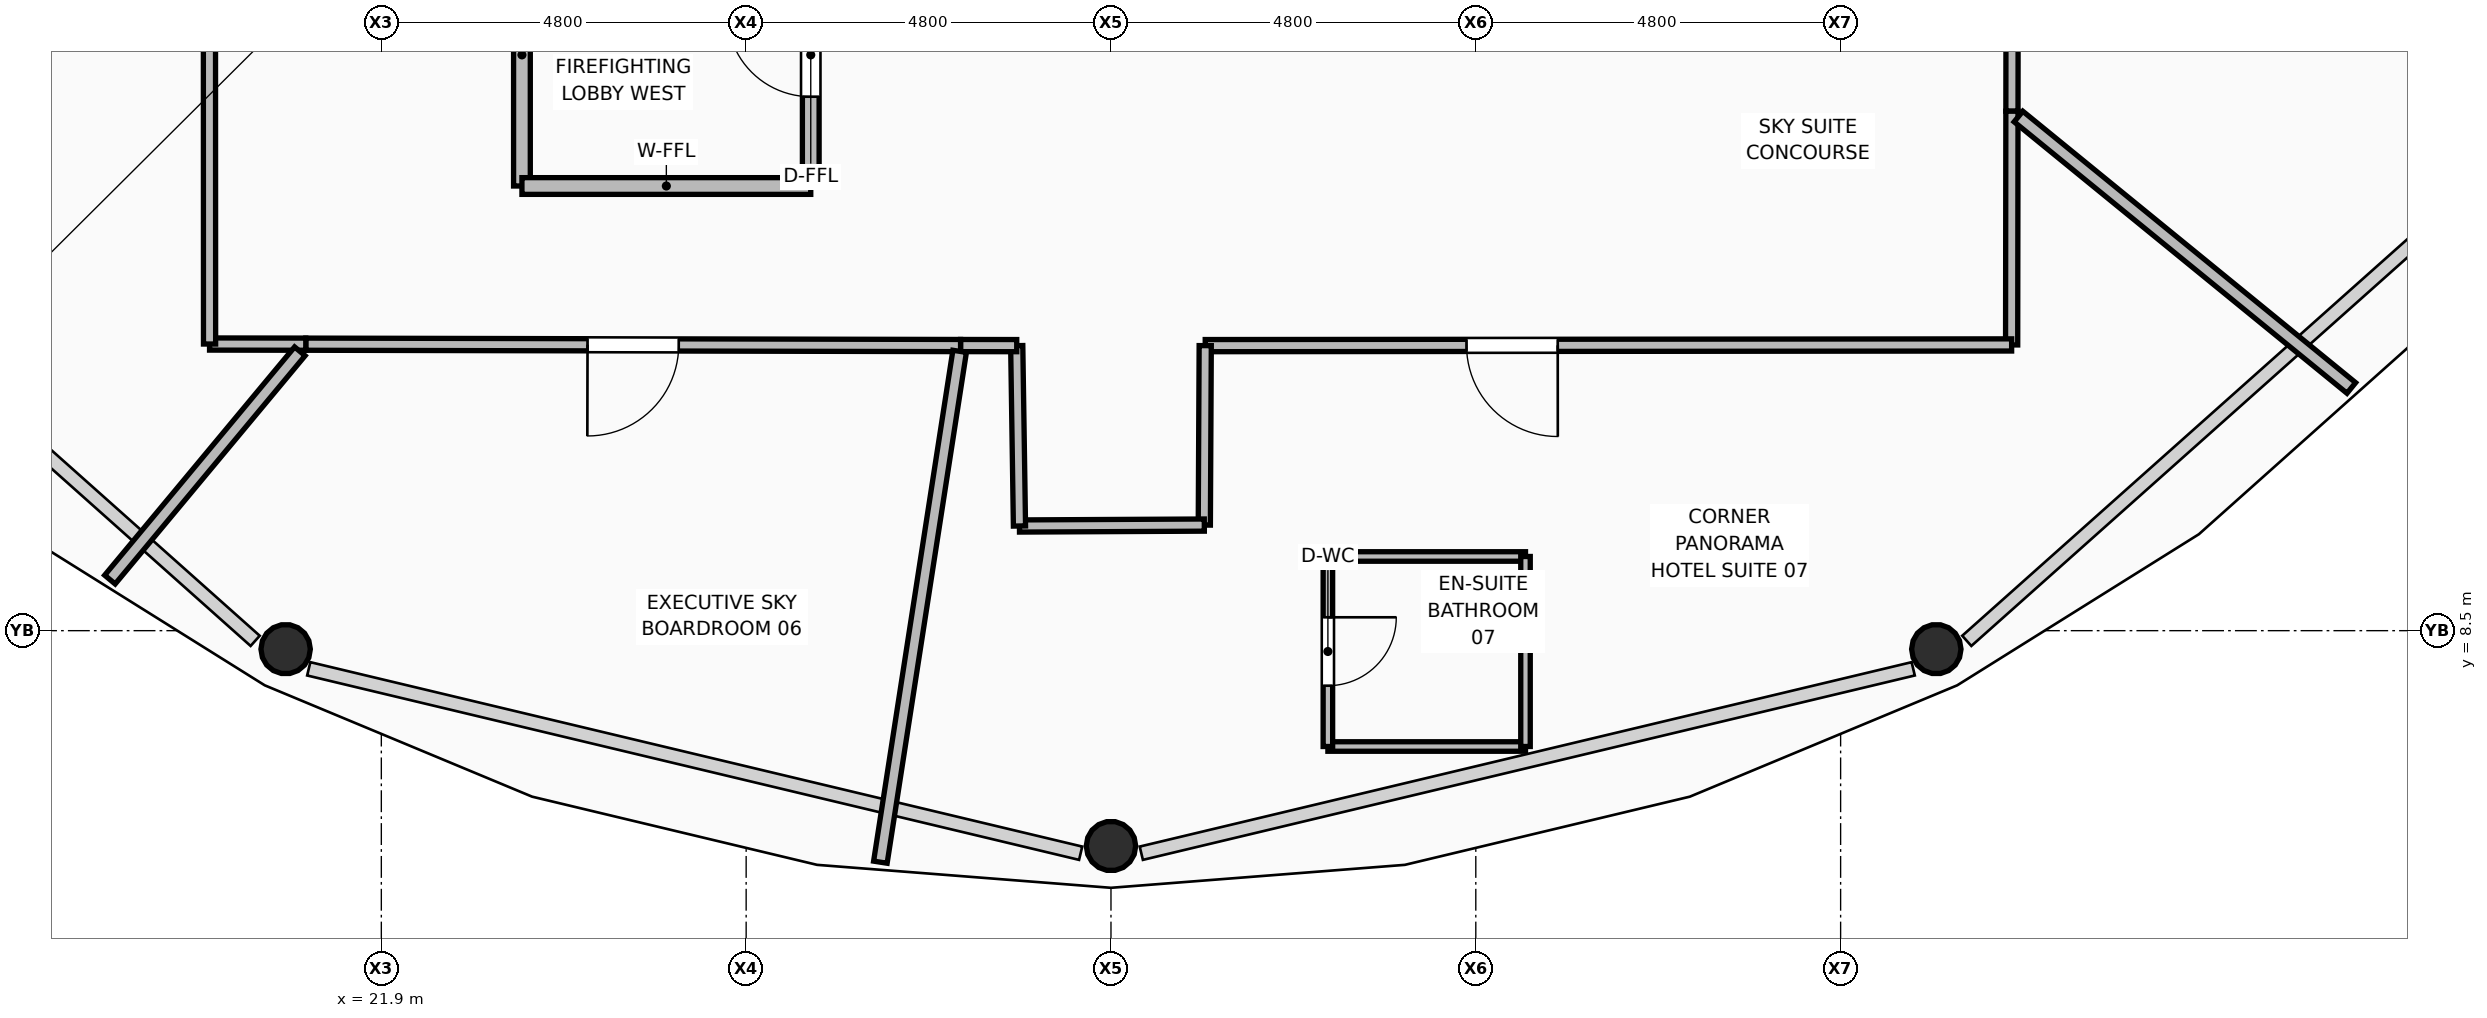
"""IFC4 building model, lengths in metres.
Left out: names, types, materials, properties, quantities, classifications, styles, units other than length and angle.
Written with IfcOpenShell. Run it as: python <this file> out.ifc"""

import sys

from ifc_helpers import new_model, si_unit, direction, frame, frame_2d, origin, origin_2d, place, context, subcontext, project, spatial, rectangle, hollow_circle, extrude, element, fill, save


model = new_model("IFC4")
c1 = context("Model", 3, precision=1e-05, world=origin(), true_north=direction((0.0, 1.0)))
c2 = subcontext(c1, "Body", "Model", "MODEL_VIEW")
j1 = project(units=[si_unit("LENGTHUNIT", "METRE"), si_unit("PLANEANGLEUNIT", "RADIAN")], contexts=[c1])
p1 = place(None, origin())
s1 = spatial("IfcSite", under=j1, at=p1, CompositionType="ELEMENT")
p2 = place(p1, origin())
s2 = spatial("IfcBuilding", under=s1, at=p2, CompositionType="ELEMENT")
p3 = place(p2, frame((0.0, 0.0, 242.4)))
s3 = spatial("IfcBuildingStorey", under=s2, at=p3, CompositionType="ELEMENT", Elevation=242.4)
for number, where, z_axis, x_axis in (
    (1, (20.641, 8.257, 0.0), (0.0, 0.0, 1.0), (1.0, 0.0, 0.0)),
    (2, (31.5, 5.667, 0.0), (0.0, 0.0, 1.0), (1.0, 0.0, 0.0)),
    (3, (42.359, 8.257, 0.0), (0.0, 0.0, 1.0), (1.0, 0.0, 0.0)),
):
    element("IfcColumn", number, at=place(p3, frame(where, z_axis=z_axis, x_axis=x_axis)), inside=s3, PredefinedType="COLUMN", context=c2, shape_type="SweptSolid", body=[
        extrude(hollow_circle(Radius=0.325, WallThickness=0.03, at=origin_2d()), origin(), (0.0, 0.0, 1.0), 3.57),
    ])
p4 = place(p3, frame((23.75, 14.35, 0.0), z_axis=(0.0, 0.0, 1.0), x_axis=(0.0, 1.0, 0.0)))
e4 = element("IfcWall", 4, at=p4, inside=s3, PredefinedType="PARTITIONING", context=c2, shape_type="SweptSolid", body=[
    extrude(rectangle(XDim=3.45, YDim=0.22, at=frame_2d((1.725, 0.0))), origin(), (0.0, 0.0, 1.0), 3.081),
])
p5 = place(p3, frame((23.75, 14.35, 0.0), z_axis=(0.0, 0.0, 1.0), x_axis=(1.0, 0.0, 0.0)))
e5 = element("IfcWall", 5, at=p5, inside=s3, PredefinedType="PARTITIONING", context=c2, shape_type="SweptSolid", body=[
    extrude(rectangle(XDim=3.8, YDim=0.22, at=frame_2d((1.9, 0.0))), origin(), (0.0, 0.0, 1.0), 3.55),
])
p6 = place(p3, frame((27.55, 14.35, 0.0), z_axis=(0.0, 0.0, 1.0), x_axis=(0.0, 1.0, 0.0)))
e6 = element("IfcWall", 6, at=p6, inside=s3, PredefinedType="PARTITIONING", context=c2, shape_type="SweptSolid", body=[
    extrude(rectangle(XDim=3.45, YDim=0.22, at=frame_2d((1.725, 0.0))), origin(), (0.0, 0.0, 1.0), 3.081),
])
p7 = place(p6, frame((1.175, 0.0, 0.0)))
e7 = element("IfcOpeningElement", 7, at=p7, cuts=e6, PredefinedType="OPENING", context=c2, shape_type="SweptSolid", body=[
    extrude(rectangle(XDim=1.1, YDim=2.1, at=frame_2d((0.55, 1.05))), frame((0.0, 0.12, 0.0), z_axis=(0.0, -1.0, 0.0), x_axis=(1.0, 0.0, 0.0)), (0.0, 0.0, 1.0), 0.24),
])
p8 = place(p3, frame((43.365, 23.56, 0.0), z_axis=(0.0, 0.0, 1.0), x_axis=(-0.001335548165, -0.999999108155, 0.0)))
e8 = element("IfcWall", 8, at=p8, inside=s3, PredefinedType="PARTITIONING", context=c2, shape_type="SweptSolid", body=[
    extrude(rectangle(XDim=8.226, YDim=0.16, at=frame_2d((4.113, 0.0))), origin(), (0.0, 0.0, 1.0), 3.081),
])
p9 = place(p8, frame((0.16, 0.0, 0.0)))
e9 = element("IfcOpeningElement", 9, at=p9, cuts=e8, PredefinedType="OPENING", context=c2, shape_type="SweptSolid", body=[
    extrude(rectangle(XDim=1.2, YDim=2.1, at=frame_2d((0.6, 1.05))), frame((0.0, 0.09, 0.0), z_axis=(0.0, -1.0, 0.0), x_axis=(1.0, 0.0, 0.0)), (0.0, 0.0, 1.0), 0.18),
])
p10 = place(p3, frame((43.354, 15.334, 0.0), z_axis=(0.0, 0.0, 1.0), x_axis=(-0.00127034435, -0.999999193112, 0.0)))
e10 = element("IfcWall", 10, at=p10, inside=s3, PredefinedType="PARTITIONING", context=c2, shape_type="SweptSolid", body=[
    extrude(rectangle(XDim=3.075, YDim=0.16, at=frame_2d((1.538, 0.0))), origin(), (0.0, 0.0, 1.0), 3.55),
])
p11 = place(p3, frame((43.35, 12.259, 0.0), z_axis=(0.0, 0.0, 1.0), x_axis=(-0.999999637579, -0.000851376852, 0.0)))
e11 = element("IfcWall", 11, at=p11, inside=s3, PredefinedType="PARTITIONING", context=c2, shape_type="SweptSolid", body=[
    extrude(rectangle(XDim=10.61, YDim=0.16, at=frame_2d((5.305, 0.0))), origin(), (0.0, 0.0, 1.0), 3.081),
])
p12 = place(p11, frame((5.972, 0.0, 0.0)))
e12 = element("IfcOpeningElement", 12, at=p12, cuts=e11, PredefinedType="OPENING", context=c2, shape_type="SweptSolid", body=[
    extrude(rectangle(XDim=1.2, YDim=2.1, at=frame_2d((0.6, 1.05))), frame((0.0, 0.09, 0.0), z_axis=(0.0, -1.0, 0.0), x_axis=(1.0, 0.0, 0.0)), (0.0, 0.0, 1.0), 0.18),
])
p13 = place(p3, frame((32.74, 12.25, 0.0), z_axis=(0.0, 0.0, 1.0), x_axis=(-0.005066629207, -0.999987164552, 0.0)))
e13 = element("IfcWall", 13, at=p13, inside=s3, PredefinedType="PARTITIONING", context=c2, shape_type="SweptSolid", body=[
    extrude(rectangle(XDim=2.361, YDim=0.16, at=frame_2d((1.181, 0.0))), origin(), (0.0, 0.0, 1.0), 3.55),
])
p14 = place(p3, frame((32.728, 9.889, 0.0), z_axis=(0.0, 0.0, 1.0), x_axis=(-0.999987903459, -0.004918631527, 0.0)))
e14 = element("IfcWall", 14, at=p14, inside=s3, PredefinedType="PARTITIONING", context=c2, shape_type="SweptSolid", body=[
    extrude(rectangle(XDim=2.432, YDim=0.16, at=frame_2d((1.216, 0.0))), origin(), (0.0, 0.0, 1.0), 3.081),
])
p15 = place(p3, frame((30.296, 9.877, 0.0), z_axis=(0.0, 0.0, 1.0), x_axis=(-0.015121727576, 0.999885660141, 0.0)))
e15 = element("IfcWall", 15, at=p15, inside=s3, PredefinedType="PARTITIONING", context=c2, shape_type="SweptSolid", body=[
    extrude(rectangle(XDim=2.373, YDim=0.16, at=frame_2d((1.187, 0.0))), origin(), (0.0, 0.0, 1.0), 3.55),
])
p16 = place(p3, frame((30.26, 12.25, 0.0), z_axis=(0.0, 0.0, 1.0), x_axis=(-0.999999126899, 0.001321439216, 0.0)))
e16 = element("IfcWall", 16, at=p16, inside=s3, PredefinedType="PARTITIONING", context=c2, shape_type="SweptSolid", body=[
    extrude(rectangle(XDim=0.739, YDim=0.16, at=frame_2d((0.37, 0.0))), origin(), (0.0, 0.0, 1.0), 3.55),
])
p17 = place(p3, frame((29.521, 12.251, 0.0), z_axis=(0.0, 0.0, 1.0), x_axis=(-0.999997801115, 0.002097084968, 0.0)))
e17 = element("IfcWall", 17, at=p17, inside=s3, PredefinedType="PARTITIONING", context=c2, shape_type="SweptSolid", body=[
    extrude(rectangle(XDim=8.615, YDim=0.16, at=frame_2d((4.308, 0.0))), origin(), (0.0, 0.0, 1.0), 3.081),
])
p18 = place(p17, frame((3.708, 0.0, 0.0)))
e18 = element("IfcOpeningElement", 18, at=p18, cuts=e17, PredefinedType="OPENING", context=c2, shape_type="SweptSolid", body=[
    extrude(rectangle(XDim=1.2, YDim=2.1, at=frame_2d((0.6, 1.05))), frame((0.0, 0.09, 0.0), z_axis=(0.0, -1.0, 0.0), x_axis=(1.0, 0.0, 0.0)), (0.0, 0.0, 1.0), 0.18),
])
p19 = place(p3, frame((20.906, 12.269, 0.0), z_axis=(0.0, 0.0, 1.0), x_axis=(-0.999998810172, 0.001542612897, 0.0)))
e19 = element("IfcWall", 19, at=p19, inside=s3, PredefinedType="PARTITIONING", context=c2, shape_type="SweptSolid", body=[
    extrude(rectangle(XDim=1.266, YDim=0.16, at=frame_2d((0.633, 0.0))), origin(), (0.0, 0.0, 1.0), 3.55),
])
p20 = place(p3, frame((19.64, 12.271, 0.0), z_axis=(0.0, 0.0, 1.0), x_axis=(-0.000368697551, 0.999999932031, 0.0)))
e20 = element("IfcWall", 20, at=p20, inside=s3, PredefinedType="PARTITIONING", context=c2, shape_type="SweptSolid", body=[
    extrude(rectangle(XDim=7.946, YDim=0.16, at=frame_2d((3.973, 0.0))), origin(), (0.0, 0.0, 1.0), 3.081),
])
p21 = place(p20, frame((6.138, 0.0, 0.0)))
e21 = element("IfcOpeningElement", 21, at=p21, cuts=e20, PredefinedType="OPENING", context=c2, shape_type="SweptSolid", body=[
    extrude(rectangle(XDim=1.2, YDim=2.1, at=frame_2d((0.6, 1.05))), frame((0.0, 0.09, 0.0), z_axis=(0.0, -1.0, 0.0), x_axis=(1.0, 0.0, 0.0)), (0.0, 0.0, 1.0), 0.18),
])
p22 = place(p3, frame((20.828, 12.175, 0.0), z_axis=(0.0, 0.0, 1.0), x_axis=(-0.639631003839, -0.768682105248, 0.0)))
e22 = element("IfcWall", 22, at=p22, inside=s3, PredefinedType="PARTITIONING", context=c2, shape_type="SweptSolid", body=[
    extrude(rectangle(XDim=3.906, YDim=0.18, at=frame_2d((1.953, 0.0))), origin(), (0.0, 0.0, 1.0), 2.925),
])
p23 = place(p3, frame((29.509, 12.175, 0.0), z_axis=(0.0, 0.0, 1.0), x_axis=(-0.15334639492, -0.988172496665, 0.0)))
e23 = element("IfcWall", 23, at=p23, inside=s3, PredefinedType="PARTITIONING", context=c2, shape_type="SweptSolid", body=[
    extrude(rectangle(XDim=6.801, YDim=0.18, at=frame_2d((3.401, 0.0))), origin(), (0.0, 0.0, 1.0), 2.925),
])
p24 = place(p3, frame((43.44, 15.264, 0.0), z_axis=(0.0, 0.0, 1.0), x_axis=(0.77500924649, -0.631949893469, 0.0)))
e24 = element("IfcWall", 24, at=p24, inside=s3, PredefinedType="PARTITIONING", context=c2, shape_type="SweptSolid", body=[
    extrude(rectangle(XDim=5.65, YDim=0.18, at=frame_2d((2.825, 0.0))), origin(), (0.0, 0.0, 1.0), 2.925),
])
p25 = place(p3, frame((34.354, 6.976, 0.0), z_axis=(0.0, 0.0, 1.0), x_axis=(1.0, 0.0, 0.0)))
e25 = element("IfcWall", 25, at=p25, inside=s3, PredefinedType="PARTITIONING", context=c2, shape_type="SweptSolid", body=[
    extrude(rectangle(XDim=2.6, YDim=0.125, at=frame_2d((1.3, 0.0))), origin(), (0.0, 0.0, 1.0), 2.925),
])
p26 = place(p3, frame((34.354, 9.476, 0.0), z_axis=(0.0, 0.0, 1.0), x_axis=(1.0, 0.0, 0.0)))
e26 = element("IfcWall", 26, at=p26, inside=s3, PredefinedType="PARTITIONING", context=c2, shape_type="SweptSolid", body=[
    extrude(rectangle(XDim=2.6, YDim=0.125, at=frame_2d((1.3, 0.0))), origin(), (0.0, 0.0, 1.0), 3.55),
])
p27 = place(p3, frame((34.354, 6.976, 0.0), z_axis=(0.0, 0.0, 1.0), x_axis=(0.0, 1.0, 0.0)))
e27 = element("IfcWall", 27, at=p27, inside=s3, PredefinedType="PARTITIONING", context=c2, shape_type="SweptSolid", body=[
    extrude(rectangle(XDim=2.5, YDim=0.125, at=frame_2d((1.25, 0.0))), origin(), (0.0, 0.0, 1.0), 3.55),
])
p28 = place(p27, frame((0.8, 0.0, 0.0)))
e28 = element("IfcOpeningElement", 28, at=p28, cuts=e27, PredefinedType="OPENING", context=c2, shape_type="SweptSolid", body=[
    extrude(rectangle(XDim=0.9, YDim=2.1, at=frame_2d((0.45, 1.05))), frame((0.0, 0.073, 0.0), z_axis=(0.0, -1.0, 0.0), x_axis=(1.0, 0.0, 0.0)), (0.0, 0.0, 1.0), 0.145),
])
p29 = place(p3, frame((36.954, 6.976, 0.0), z_axis=(0.0, 0.0, 1.0), x_axis=(0.0, 1.0, 0.0)))
e29 = element("IfcWall", 29, at=p29, inside=s3, PredefinedType="PARTITIONING", context=c2, shape_type="SweptSolid", body=[
    extrude(rectangle(XDim=2.5, YDim=0.125, at=frame_2d((1.25, 0.0))), origin(), (0.0, 0.0, 1.0), 2.925),
])
p30 = place(p7, origin())
e30 = element("IfcDoor", 30, at=p30, inside=s3, OperationType="SINGLE_SWING_RIGHT", PredefinedType="DOOR", context=c2, shape_type="SweptSolid", body=[
    extrude(rectangle(XDim=1.1, YDim=2.1, at=frame_2d((0.55, 1.05))), frame((0.0, 0.025, 0.0), z_axis=(0.0, -1.0, 0.0), x_axis=(1.0, 0.0, 0.0)), (0.0, 0.0, 1.0), 0.05),
])
fill(e7, e30)
p31 = place(p18, origin())
e31 = element("IfcDoor", 31, at=p31, inside=s3, OperationType="SINGLE_SWING_RIGHT", PredefinedType="DOOR", context=c2, shape_type="SweptSolid", body=[
    extrude(rectangle(XDim=1.2, YDim=2.1, at=frame_2d((0.6, 1.05))), frame((0.0, 0.025, 0.0), z_axis=(0.0, -1.0, 0.0), x_axis=(1.0, 0.0, 0.0)), (0.0, 0.0, 1.0), 0.05),
])
fill(e18, e31)
p32 = place(p28, frame((0.9, 0.0, 0.0), z_axis=(0.0, 0.0, 1.0), x_axis=(-1.0, 0.0, 0.0)))
e32 = element("IfcDoor", 32, at=p32, inside=s3, OperationType="SINGLE_SWING_LEFT", PredefinedType="DOOR", context=c2, shape_type="SweptSolid", body=[
    extrude(rectangle(XDim=0.9, YDim=2.1, at=frame_2d((0.45, 1.05))), frame((0.0, 0.025, 0.0), z_axis=(0.0, -1.0, 0.0), x_axis=(1.0, 0.0, 0.0)), (0.0, 0.0, 1.0), 0.05),
])
fill(e28, e32)
p33 = place(p12, origin())
e33 = element("IfcDoor", 33, at=p33, inside=s3, OperationType="SINGLE_SWING_LEFT", PredefinedType="DOOR", context=c2, shape_type="SweptSolid", body=[
    extrude(rectangle(XDim=1.2, YDim=2.1, at=frame_2d((0.6, 1.05))), frame((0.0, 0.025, 0.0), z_axis=(0.0, -1.0, 0.0), x_axis=(1.0, 0.0, 0.0)), (0.0, 0.0, 1.0), 0.05),
])
fill(e12, e33)
save(model, sys.argv[1])
